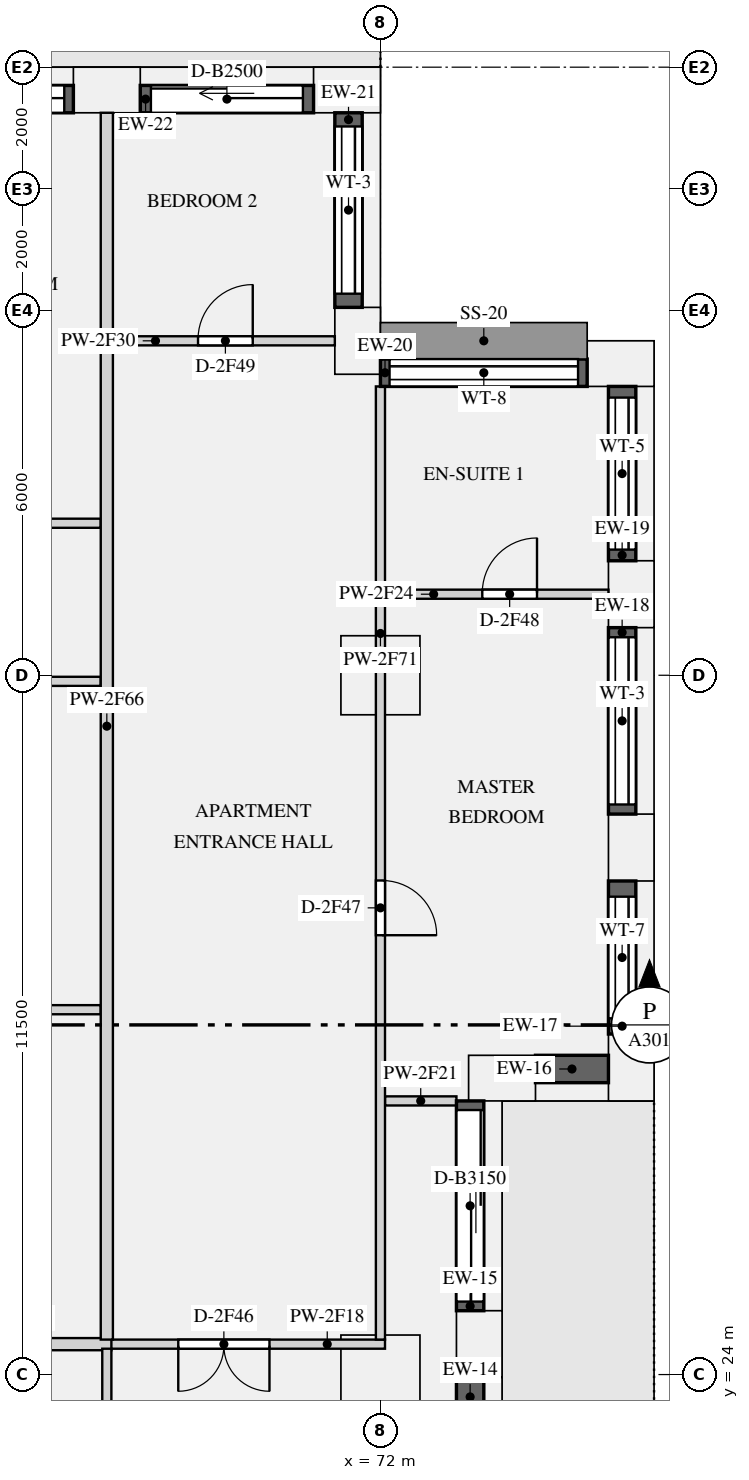
"""IFC4 building model, lengths in metres.
Left out: names, types, materials, properties, quantities, classifications, styles, units other than length and angle.
Written with IfcOpenShell. Run it as: python <this file> out.ifc"""

import sys

from ifc_helpers import new_model, si_unit, direction, frame, frame_2d, origin, origin_2d, place, context, subcontext, project, spatial, rectangle, extrude, element, fill, save


model = new_model("IFC4")
c1 = context("Model", 3, precision=1e-05, world=origin(), true_north=direction((0.0, 1.0)))
c2 = subcontext(c1, "Body", "Model", "MODEL_VIEW")
j1 = project(units=[si_unit("LENGTHUNIT", "METRE"), si_unit("PLANEANGLEUNIT", "RADIAN")], contexts=[c1])
p1 = place(None, origin())
s1 = spatial("IfcSite", under=j1, at=p1, CompositionType="ELEMENT")
p2 = place(p1, origin())
s2 = spatial("IfcBuilding", under=s1, at=p2, CompositionType="ELEMENT")
p3 = place(p2, frame((0.0, 0.0, 124.5)))
s3 = spatial("IfcBuildingStorey", under=s2, at=p3, CompositionType="ELEMENT", Elevation=124.5)
for number, where, z_axis, x_axis in (
    (1, (73.625, 24.5, 0.0), (0.0, 0.0, 1.0), (0.0, 1.0, 0.0)),
    (2, (74.0, 28.875, 0.0), (0.0, 0.0, 1.0), (1.0, 0.0, 0.0)),
    (3, (76.125, 29.05, 0.0), (0.0, 0.0, 1.0), (0.0, 1.0, 0.0)),
    (4, (76.125, 32.667, 0.0), (0.0, 0.0, 1.0), (0.0, 1.0, 0.0)),
    (5, (76.125, 36.833, 0.0), (0.0, 0.0, 1.0), (0.0, 1.0, 0.0)),
    (6, (75.95, 40.625, 0.0), (0.0, 0.0, 1.0), (-1.0, 0.0, 0.0)),
    (7, (71.625, 41.0, 0.0), (0.0, 0.0, 1.0), (0.0, 1.0, 0.0)),
    (8, (71.45, 45.125, 0.0), (0.0, 0.0, 1.0), (-1.0, 0.0, 0.0)),
    (9, (67.5, 45.125, 0.0), (0.0, 0.0, 1.0), (-1.0, 0.0, 0.0)),
):
    element("IfcColumn", number, at=place(p3, frame(where, z_axis=z_axis, x_axis=x_axis)), inside=s3, PredefinedType="USERDEFINED", context=c2, shape_type="SweptSolid", body=[
        extrude(rectangle(XDim=1.1, YDim=0.75, at=origin_2d()), origin(), (0.0, 0.0, 1.0), 3.15),
    ])
for number, where, z_axis, x_axis in (
    (10, (72.0, 24.0, 0.0), (0.0, 0.0, 1.0), (1.0, 0.0, 0.0)),
    (11, (72.0, 35.5, 0.0), (0.0, 0.0, 1.0), (1.0, 0.0, 0.0)),
):
    element("IfcColumn", number, at=place(p3, frame(where, z_axis=z_axis, x_axis=x_axis)), inside=s3, PredefinedType="COLUMN", context=c2, shape_type="SweptSolid", body=[
        extrude(rectangle(XDim=1.3, YDim=1.3, at=origin_2d()), origin(), (0.0, 0.0, 1.0), 3.15),
    ])
p4 = place(p3, frame((73.475, 21.05, 0.0), z_axis=(0.0, 0.0, 1.0), x_axis=(0.0, 1.0, 0.0)))
e12 = element("IfcWall", 12, at=p4, inside=s3, PredefinedType="SOLIDWALL", context=c2, shape_type="SweptSolid", body=[
    extrude(rectangle(XDim=2.9, YDim=0.45, at=frame_2d((1.45, 0.0))), origin(), (0.0, 0.0, 1.0), 2.83),
])
p5 = place(p4, frame((0.165, 0.0, 0.0)))
e13 = element("IfcOpeningElement", 13, at=p5, cuts=e12, PredefinedType="OPENING", context=c2, shape_type="SweptSolid", body=[
    extrude(rectangle(XDim=2.1, YDim=2.3, at=frame_2d((1.05, 1.15))), frame((0.0, 0.235, 0.0), z_axis=(0.0, -1.0, 0.0), x_axis=(1.0, 0.0, 0.0)), (0.0, 0.0, 1.0), 0.47),
])
p6 = place(p3, frame((73.475, 25.05, 0.0), z_axis=(0.0, 0.0, 1.0), x_axis=(0.0, 1.0, 0.0)))
e14 = element("IfcWall", 14, at=p6, inside=s3, PredefinedType="SOLIDWALL", context=c2, shape_type="SweptSolid", body=[
    extrude(rectangle(XDim=3.45, YDim=0.45, at=frame_2d((1.725, 0.0))), origin(), (0.0, 0.0, 1.0), 2.83),
])
p7 = place(p6, frame((0.15, 0.0, 0.0)))
e15 = element("IfcOpeningElement", 15, at=p7, cuts=e14, PredefinedType="OPENING", context=c2, shape_type="SweptSolid", body=[
    extrude(rectangle(XDim=3.15, YDim=2.3, at=frame_2d((1.575, 1.15))), frame((0.0, 0.235, 0.0), z_axis=(0.0, -1.0, 0.0), x_axis=(1.0, 0.0, 0.0)), (0.0, 0.0, 1.0), 0.47),
])
p8 = place(p3, frame((74.55, 29.025, 0.9), z_axis=(0.0, 0.0, 1.0), x_axis=(1.0, 0.0, 0.0)))
e16 = element("IfcWall", 16, at=p8, inside=s3, PredefinedType="SOLIDWALL", context=c2, shape_type="SweptSolid", body=[
    extrude(rectangle(XDim=1.2, YDim=0.45, at=frame_2d((0.6, 0.0))), origin(), (0.0, 0.0, 1.0), 1.93),
])
p9 = place(p3, frame((75.975, 29.6, 0.9), z_axis=(0.0, 0.0, 1.0), x_axis=(0.0, 1.0, 0.0)))
e17 = element("IfcWall", 17, at=p9, inside=s3, PredefinedType="SOLIDWALL", context=c2, shape_type="SweptSolid", body=[
    extrude(rectangle(XDim=2.517, YDim=0.45, at=frame_2d((1.258, 0.0))), origin(), (0.0, 0.0, 1.0), 1.93),
])
p10 = place(p9, frame((0.259, 0.0, 0.15)))
e18 = element("IfcOpeningElement", 18, at=p10, cuts=e17, PredefinedType="OPENING", context=c2, shape_type="SweptSolid", body=[
    extrude(rectangle(XDim=2.0, YDim=1.5, at=frame_2d((1.0, 0.75))), frame((0.0, 0.235, 0.0), z_axis=(0.0, -1.0, 0.0), x_axis=(1.0, 0.0, 0.0)), (0.0, 0.0, 1.0), 0.47),
])
p11 = place(p3, frame((75.975, 33.217, 0.9), z_axis=(0.0, 0.0, 1.0), x_axis=(0.0, 1.0, 0.0)))
e19 = element("IfcWall", 19, at=p11, inside=s3, PredefinedType="SOLIDWALL", context=c2, shape_type="SweptSolid", body=[
    extrude(rectangle(XDim=3.066, YDim=0.45, at=frame_2d((1.533, 0.0))), origin(), (0.0, 0.0, 1.0), 1.93),
])
p12 = place(p11, frame((0.158, 0.0, 0.15)))
e20 = element("IfcOpeningElement", 20, at=p12, cuts=e19, PredefinedType="OPENING", context=c2, shape_type="SweptSolid", body=[
    extrude(rectangle(XDim=2.75, YDim=1.5, at=frame_2d((1.375, 0.75))), frame((0.0, 0.235, 0.0), z_axis=(0.0, -1.0, 0.0), x_axis=(1.0, 0.0, 0.0)), (0.0, 0.0, 1.0), 0.47),
])
p13 = place(p3, frame((75.975, 37.383, 0.9), z_axis=(0.0, 0.0, 1.0), x_axis=(0.0, 1.0, 0.0)))
e21 = element("IfcWall", 21, at=p13, inside=s3, PredefinedType="SOLIDWALL", context=c2, shape_type="SweptSolid", body=[
    extrude(rectangle(XDim=2.867, YDim=0.45, at=frame_2d((1.434, 0.0))), origin(), (0.0, 0.0, 1.0), 1.93),
])
p14 = place(p13, frame((0.184, 0.0, 0.15)))
e22 = element("IfcOpeningElement", 22, at=p14, cuts=e21, PredefinedType="OPENING", context=c2, shape_type="SweptSolid", body=[
    extrude(rectangle(XDim=2.5, YDim=1.5, at=frame_2d((1.25, 0.75))), frame((0.0, 0.235, 0.0), z_axis=(0.0, -1.0, 0.0), x_axis=(1.0, 0.0, 0.0)), (0.0, 0.0, 1.0), 0.47),
])
p15 = place(p3, frame((75.4, 40.475, 0.9), z_axis=(0.0, 0.0, 1.0), x_axis=(-1.0, 0.0, 0.0)))
e23 = element("IfcWall", 23, at=p15, inside=s3, PredefinedType="SOLIDWALL", context=c2, shape_type="SweptSolid", body=[
    extrude(rectangle(XDim=3.4, YDim=0.45, at=frame_2d((1.7, 0.0))), origin(), (0.0, 0.0, 1.0), 1.93),
])
p16 = place(p15, frame((0.15, 0.0, 0.15)))
e24 = element("IfcOpeningElement", 24, at=p16, cuts=e23, PredefinedType="OPENING", context=c2, shape_type="SweptSolid", body=[
    extrude(rectangle(XDim=3.1, YDim=1.5, at=frame_2d((1.55, 0.75))), frame((0.0, 0.235, 0.0), z_axis=(0.0, -1.0, 0.0), x_axis=(1.0, 0.0, 0.0)), (0.0, 0.0, 1.0), 0.47),
])
p17 = place(p3, frame((71.475, 41.55, 0.9), z_axis=(0.0, 0.0, 1.0), x_axis=(0.0, 1.0, 0.0)))
e25 = element("IfcWall", 25, at=p17, inside=s3, PredefinedType="SOLIDWALL", context=c2, shape_type="SweptSolid", body=[
    extrude(rectangle(XDim=3.2, YDim=0.45, at=frame_2d((1.6, 0.0))), origin(), (0.0, 0.0, 1.0), 1.93),
])
p18 = place(p17, frame((0.225, 0.0, 0.15)))
e26 = element("IfcOpeningElement", 26, at=p18, cuts=e25, PredefinedType="OPENING", context=c2, shape_type="SweptSolid", body=[
    extrude(rectangle(XDim=2.75, YDim=1.5, at=frame_2d((1.375, 0.75))), frame((0.0, 0.235, 0.0), z_axis=(0.0, -1.0, 0.0), x_axis=(1.0, 0.0, 0.0)), (0.0, 0.0, 1.0), 0.47),
])
p19 = place(p3, frame((70.9, 44.975, 0.0), z_axis=(0.0, 0.0, 1.0), x_axis=(-1.0, 0.0, 0.0)))
e27 = element("IfcWall", 27, at=p19, inside=s3, PredefinedType="SOLIDWALL", context=c2, shape_type="SweptSolid", body=[
    extrude(rectangle(XDim=2.85, YDim=0.45, at=frame_2d((1.425, 0.0))), origin(), (0.0, 0.0, 1.0), 2.83),
])
p20 = place(p19, frame((0.175, 0.0, 0.0)))
e28 = element("IfcOpeningElement", 28, at=p20, cuts=e27, PredefinedType="OPENING", context=c2, shape_type="SweptSolid", body=[
    extrude(rectangle(XDim=2.5, YDim=2.3, at=frame_2d((1.25, 1.15))), frame((0.0, 0.235, 0.0), z_axis=(0.0, -1.0, 0.0), x_axis=(1.0, 0.0, 0.0)), (0.0, 0.0, 1.0), 0.47),
])
p21 = place(p3, frame((66.95, 44.975, 0.0), z_axis=(0.0, 0.0, 1.0), x_axis=(-1.0, 0.0, 0.0)))
e29 = element("IfcWall", 29, at=p21, inside=s3, PredefinedType="SOLIDWALL", context=c2, shape_type="SweptSolid", body=[
    extrude(rectangle(XDim=3.4, YDim=0.45, at=frame_2d((1.7, 0.0))), origin(), (0.0, 0.0, 1.0), 2.83),
])
p22 = place(p21, frame((0.15, 0.0, 0.0)))
e30 = element("IfcOpeningElement", 30, at=p22, cuts=e29, PredefinedType="OPENING", context=c2, shape_type="SweptSolid", body=[
    extrude(rectangle(XDim=3.1, YDim=2.3, at=frame_2d((1.55, 1.15))), frame((0.0, 0.235, 0.0), z_axis=(0.0, -1.0, 0.0), x_axis=(1.0, 0.0, 0.0)), (0.0, 0.0, 1.0), 0.47),
])
p23 = place(p3, frame((67.425, 24.5, 0.0), z_axis=(0.0, 0.0, 1.0), x_axis=(1.0, 0.0, 0.0)))
e31 = element("IfcWall", 31, at=p23, inside=s3, PredefinedType="PARTITIONING", context=c2, shape_type="SweptSolid", body=[
    extrude(rectangle(XDim=4.65, YDim=0.15, at=frame_2d((2.325, 0.0))), origin(), (0.0, 0.0, 1.0), 2.83),
])
p24 = place(p23, frame((1.25, 0.0, 0.0)))
e32 = element("IfcOpeningElement", 32, at=p24, cuts=e31, PredefinedType="OPENING", context=c2, shape_type="SweptSolid", body=[
    extrude(rectangle(XDim=1.5, YDim=2.1, at=frame_2d((0.75, 1.05))), frame((0.0, 0.085, 0.0), z_axis=(0.0, -1.0, 0.0), x_axis=(1.0, 0.0, 0.0)), (0.0, 0.0, 1.0), 0.17),
])
p25 = place(p3, frame((64.4, 24.5, 0.0), z_axis=(0.0, 0.0, 1.0), x_axis=(1.0, 0.0, 0.0)))
e33 = element("IfcWall", 33, at=p25, inside=s3, PredefinedType="PARTITIONING", context=c2, shape_type="SweptSolid", body=[
    extrude(rectangle(XDim=3.175, YDim=0.2, at=frame_2d((1.587, 0.0))), origin(), (0.0, 0.0, 1.0), 2.83),
])
p26 = place(p3, frame((72.075, 28.5, 0.0), z_axis=(0.0, 0.0, 1.0), x_axis=(1.0, 0.0, 0.0)))
e34 = element("IfcWall", 34, at=p26, inside=s3, PredefinedType="PARTITIONING", context=c2, shape_type="SweptSolid", body=[
    extrude(rectangle(XDim=1.175, YDim=0.15, at=frame_2d((0.587, 0.0))), origin(), (0.0, 0.0, 1.0), 2.83),
])
p27 = place(p3, frame((72.075, 36.833, 0.0), z_axis=(0.0, 0.0, 1.0), x_axis=(1.0, 0.0, 0.0)))
e35 = element("IfcWall", 35, at=p27, inside=s3, PredefinedType="PARTITIONING", context=c2, shape_type="SweptSolid", body=[
    extrude(rectangle(XDim=3.675, YDim=0.15, at=frame_2d((1.837, 0.0))), origin(), (0.0, 0.0, 1.0), 2.83),
])
p28 = place(p27, frame((1.6, 0.0, 0.0)))
e36 = element("IfcOpeningElement", 36, at=p28, cuts=e35, PredefinedType="OPENING", context=c2, shape_type="SweptSolid", body=[
    extrude(rectangle(XDim=0.9, YDim=2.1, at=frame_2d((0.45, 1.05))), frame((0.0, 0.085, 0.0), z_axis=(0.0, -1.0, 0.0), x_axis=(1.0, 0.0, 0.0)), (0.0, 0.0, 1.0), 0.17),
])
p29 = place(p3, frame((59.8, 35.4, 0.0), z_axis=(0.0, 0.0, 1.0), x_axis=(1.0, 0.0, 0.0)))
e37 = element("IfcWall", 37, at=p29, inside=s3, PredefinedType="PARTITIONING", context=c2, shape_type="SweptSolid", body=[
    extrude(rectangle(XDim=7.6, YDim=0.15, at=frame_2d((3.8, 0.0))), origin(), (0.0, 0.0, 1.0), 2.83),
])
p30 = place(p29, frame((5.325, 0.0, 0.0)))
e38 = element("IfcOpeningElement", 38, at=p30, cuts=e37, PredefinedType="OPENING", context=c2, shape_type="SweptSolid", body=[
    extrude(rectangle(XDim=0.9, YDim=2.1, at=frame_2d((0.45, 1.05))), frame((0.0, 0.085, 0.0), z_axis=(0.0, -1.0, 0.0), x_axis=(1.0, 0.0, 0.0)), (0.0, 0.0, 1.0), 0.17),
])
p31 = place(p3, frame((67.6, 41.0, 0.0), z_axis=(0.0, 0.0, 1.0), x_axis=(1.0, 0.0, 0.0)))
e39 = element("IfcWall", 39, at=p31, inside=s3, PredefinedType="PARTITIONING", context=c2, shape_type="SweptSolid", body=[
    extrude(rectangle(XDim=3.65, YDim=0.15, at=frame_2d((1.825, 0.0))), origin(), (0.0, 0.0, 1.0), 2.83),
])
p32 = place(p31, frame((1.4, 0.0, 0.0)))
e40 = element("IfcOpeningElement", 40, at=p32, cuts=e39, PredefinedType="OPENING", context=c2, shape_type="SweptSolid", body=[
    extrude(rectangle(XDim=0.9, YDim=2.1, at=frame_2d((0.45, 1.05))), frame((0.0, 0.085, 0.0), z_axis=(0.0, -1.0, 0.0), x_axis=(1.0, 0.0, 0.0)), (0.0, 0.0, 1.0), 0.17),
])
p33 = place(p3, frame((62.925, 38.0, 0.0), z_axis=(0.0, 0.0, 1.0), x_axis=(1.0, 0.0, 0.0)))
e41 = element("IfcWall", 41, at=p33, inside=s3, PredefinedType="PARTITIONING", context=c2, shape_type="SweptSolid", body=[
    extrude(rectangle(XDim=4.475, YDim=0.15, at=frame_2d((2.237, 0.0))), origin(), (0.0, 0.0, 1.0), 2.83),
])
p34 = place(p33, frame((1.875, 0.0, 0.0)))
e42 = element("IfcOpeningElement", 42, at=p34, cuts=e41, PredefinedType="OPENING", context=c2, shape_type="SweptSolid", body=[
    extrude(rectangle(XDim=0.9, YDim=2.1, at=frame_2d((0.45, 1.05))), frame((0.0, 0.085, 0.0), z_axis=(0.0, -1.0, 0.0), x_axis=(1.0, 0.0, 0.0)), (0.0, 0.0, 1.0), 0.17),
])
p35 = place(p3, frame((59.8, 30.0, 0.0), z_axis=(0.0, 0.0, 1.0), x_axis=(1.0, 0.0, 0.0)))
e43 = element("IfcWall", 43, at=p35, inside=s3, PredefinedType="PARTITIONING", context=c2, shape_type="SweptSolid", body=[
    extrude(rectangle(XDim=7.6, YDim=0.15, at=frame_2d((3.8, 0.0))), origin(), (0.0, 0.0, 1.0), 2.83),
])
p36 = place(p35, frame((1.9, 0.0, 0.0)))
e44 = element("IfcOpeningElement", 44, at=p36, cuts=e43, PredefinedType="OPENING", context=c2, shape_type="SweptSolid", body=[
    extrude(rectangle(XDim=0.9, YDim=2.1, at=frame_2d((0.45, 1.05))), frame((0.0, 0.085, 0.0), z_axis=(0.0, -1.0, 0.0), x_axis=(1.0, 0.0, 0.0)), (0.0, 0.0, 1.0), 0.17),
])
p37 = place(p3, frame((67.5, 16.575, 0.0), z_axis=(0.0, 0.0, 1.0), x_axis=(0.0, 1.0, 0.0)))
e45 = element("IfcWall", 45, at=p37, inside=s3, PredefinedType="PARTITIONING", context=c2, shape_type="SweptSolid", body=[
    extrude(rectangle(XDim=7.85, YDim=0.15, at=frame_2d((3.925, 0.0))), origin(), (0.0, 0.0, 1.0), 2.83),
])
p38 = place(p3, frame((67.5, 24.575, 0.0), z_axis=(0.0, 0.0, 1.0), x_axis=(0.0, 1.0, 0.0)))
e46 = element("IfcWall", 46, at=p38, inside=s3, PredefinedType="PARTITIONING", context=c2, shape_type="SweptSolid", body=[
    extrude(rectangle(XDim=20.175, YDim=0.2, at=frame_2d((10.087, 0.0))), origin(), (0.0, 0.0, 1.0), 2.83),
])
p39 = place(p3, frame((72.0, 24.575, 0.0), z_axis=(0.0, 0.0, 1.0), x_axis=(0.0, 1.0, 0.0)))
e47 = element("IfcWall", 47, at=p39, inside=s3, PredefinedType="PARTITIONING", context=c2, shape_type="SweptSolid", body=[
    extrude(rectangle(XDim=15.675, YDim=0.15, at=frame_2d((7.837, 0.0))), origin(), (0.0, 0.0, 1.0), 2.83),
])
p40 = place(p39, frame((6.65, 0.0, 0.0)))
e48 = element("IfcOpeningElement", 48, at=p40, cuts=e47, PredefinedType="OPENING", context=c2, shape_type="SweptSolid", body=[
    extrude(rectangle(XDim=0.9, YDim=2.1, at=frame_2d((0.45, 1.05))), frame((0.0, 0.085, 0.0), z_axis=(0.0, -1.0, 0.0), x_axis=(1.0, 0.0, 0.0)), (0.0, 0.0, 1.0), 0.17),
])
p41 = place(p7, origin())
e49 = element("IfcDoor", 49, at=p41, inside=s3, OperationType="SLIDING_TO_LEFT", PredefinedType="DOOR", context=c2, shape_type="SweptSolid", body=[
    extrude(rectangle(XDim=3.15, YDim=2.3, at=frame_2d((1.575, 1.15))), frame((0.0, -0.07, 0.0), z_axis=(0.0, -1.0, 0.0), x_axis=(1.0, 0.0, 0.0)), (0.0, 0.0, 1.0), 0.05),
])
fill(e15, e49)
p42 = place(p10, origin())
e50 = element("IfcWindow", 50, at=p42, inside=s3, PartitioningType="SINGLE_PANEL", PredefinedType="WINDOW", context=c2, shape_type="SweptSolid", body=[
    extrude(rectangle(XDim=2.0, YDim=1.5, at=frame_2d((1.0, 0.75))), frame((0.0, -0.065, 0.0), z_axis=(0.0, -1.0, 0.0), x_axis=(1.0, 0.0, 0.0)), (0.0, 0.0, 1.0), 0.06),
])
fill(e18, e50)
p43 = place(p12, origin())
e51 = element("IfcWindow", 51, at=p43, inside=s3, PartitioningType="SINGLE_PANEL", PredefinedType="WINDOW", context=c2, shape_type="SweptSolid", body=[
    extrude(rectangle(XDim=2.75, YDim=1.5, at=frame_2d((1.375, 0.75))), frame((0.0, -0.065, 0.0), z_axis=(0.0, -1.0, 0.0), x_axis=(1.0, 0.0, 0.0)), (0.0, 0.0, 1.0), 0.06),
])
fill(e20, e51)
p44 = place(p14, origin())
e52 = element("IfcWindow", 52, at=p44, inside=s3, PartitioningType="SINGLE_PANEL", PredefinedType="WINDOW", context=c2, shape_type="SweptSolid", body=[
    extrude(rectangle(XDim=2.5, YDim=1.5, at=frame_2d((1.25, 0.75))), frame((0.0, -0.065, 0.0), z_axis=(0.0, -1.0, 0.0), x_axis=(1.0, 0.0, 0.0)), (0.0, 0.0, 1.0), 0.06),
])
fill(e22, e52)
p45 = place(p16, origin())
e53 = element("IfcWindow", 53, at=p45, inside=s3, PartitioningType="SINGLE_PANEL", PredefinedType="WINDOW", context=c2, shape_type="SweptSolid", body=[
    extrude(rectangle(XDim=3.1, YDim=1.5, at=frame_2d((1.55, 0.75))), frame((0.0, -0.065, 0.0), z_axis=(0.0, -1.0, 0.0), x_axis=(1.0, 0.0, 0.0)), (0.0, 0.0, 1.0), 0.06),
])
fill(e24, e53)
p46 = place(p18, origin())
e54 = element("IfcWindow", 54, at=p46, inside=s3, PartitioningType="SINGLE_PANEL", PredefinedType="WINDOW", context=c2, shape_type="SweptSolid", body=[
    extrude(rectangle(XDim=2.75, YDim=1.5, at=frame_2d((1.375, 0.75))), frame((0.0, -0.065, 0.0), z_axis=(0.0, -1.0, 0.0), x_axis=(1.0, 0.0, 0.0)), (0.0, 0.0, 1.0), 0.06),
])
fill(e26, e54)
p47 = place(p20, origin())
e55 = element("IfcDoor", 55, at=p47, inside=s3, OperationType="SLIDING_TO_LEFT", PredefinedType="DOOR", context=c2, shape_type="SweptSolid", body=[
    extrude(rectangle(XDim=2.5, YDim=2.3, at=frame_2d((1.25, 1.15))), frame((0.0, -0.07, 0.0), z_axis=(0.0, -1.0, 0.0), x_axis=(1.0, 0.0, 0.0)), (0.0, 0.0, 1.0), 0.05),
])
fill(e28, e55)
p48 = place(p22, origin())
e56 = element("IfcDoor", 56, at=p48, inside=s3, OperationType="SLIDING_TO_LEFT", PredefinedType="DOOR", context=c2, shape_type="SweptSolid", body=[
    extrude(rectangle(XDim=3.1, YDim=2.3, at=frame_2d((1.55, 1.15))), frame((0.0, -0.07, 0.0), z_axis=(0.0, -1.0, 0.0), x_axis=(1.0, 0.0, 0.0)), (0.0, 0.0, 1.0), 0.05),
])
fill(e30, e56)
p49 = place(p24, frame((1.5, 0.0, 0.0), z_axis=(0.0, 0.0, 1.0), x_axis=(-1.0, 0.0, 0.0)))
e57 = element("IfcDoor", 57, at=p49, inside=s3, OperationType="DOUBLE_DOOR_SINGLE_SWING", PredefinedType="DOOR", context=c2, shape_type="SweptSolid", body=[
    extrude(rectangle(XDim=1.5, YDim=2.1, at=frame_2d((0.75, 1.05))), frame((0.0, 0.025, 0.0), z_axis=(0.0, -1.0, 0.0), x_axis=(1.0, 0.0, 0.0)), (0.0, 0.0, 1.0), 0.05),
])
fill(e32, e57)
p50 = place(p40, frame((0.9, 0.0, 0.0), z_axis=(0.0, 0.0, 1.0), x_axis=(-1.0, 0.0, 0.0)))
e58 = element("IfcDoor", 58, at=p50, inside=s3, OperationType="SINGLE_SWING_RIGHT", PredefinedType="DOOR", context=c2, shape_type="SweptSolid", body=[
    extrude(rectangle(XDim=0.9, YDim=2.1, at=frame_2d((0.45, 1.05))), frame((0.0, 0.025, 0.0), z_axis=(0.0, -1.0, 0.0), x_axis=(1.0, 0.0, 0.0)), (0.0, 0.0, 1.0), 0.05),
])
fill(e48, e58)
p51 = place(p28, origin())
e59 = element("IfcDoor", 59, at=p51, inside=s3, OperationType="SINGLE_SWING_RIGHT", PredefinedType="DOOR", context=c2, shape_type="SweptSolid", body=[
    extrude(rectangle(XDim=0.9, YDim=2.1, at=frame_2d((0.45, 1.05))), frame((0.0, 0.025, 0.0), z_axis=(0.0, -1.0, 0.0), x_axis=(1.0, 0.0, 0.0)), (0.0, 0.0, 1.0), 0.05),
])
fill(e36, e59)
p52 = place(p32, origin())
e60 = element("IfcDoor", 60, at=p52, inside=s3, OperationType="SINGLE_SWING_RIGHT", PredefinedType="DOOR", context=c2, shape_type="SweptSolid", body=[
    extrude(rectangle(XDim=0.9, YDim=2.1, at=frame_2d((0.45, 1.05))), frame((0.0, 0.025, 0.0), z_axis=(0.0, -1.0, 0.0), x_axis=(1.0, 0.0, 0.0)), (0.0, 0.0, 1.0), 0.05),
])
fill(e40, e60)
save(model, sys.argv[1])
